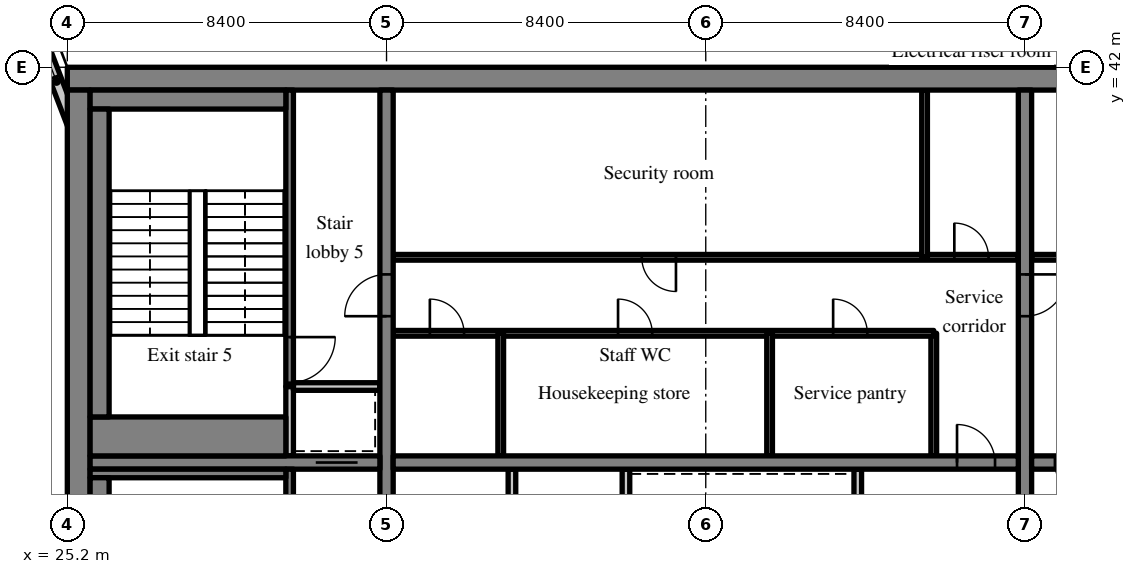
"""IFC4 building model, lengths in metres.
Left out: names, types, materials, properties, quantities, classifications, styles, units other than length and angle.
Written with IfcOpenShell. Run it as: python <this file> out.ifc"""

import sys

from ifc_helpers import new_model, si_unit, direction, frame, frame_2d, origin, place, context, subcontext, project, spatial, rectangle, extrude, source, transform, mapped, element, fill, save


model = new_model("IFC4")
c1 = context("Model", 3, precision=1e-05, world=origin(), true_north=direction((0.0, 1.0)))
c2 = subcontext(c1, "Body", "Model", "MODEL_VIEW")
j1 = project(units=[si_unit("LENGTHUNIT", "METRE"), si_unit("PLANEANGLEUNIT", "RADIAN")], contexts=[c1])
p1 = place(None, origin())
s1 = spatial("IfcSite", under=j1, at=p1, CompositionType="ELEMENT")
p2 = place(p1, origin())
s2 = spatial("IfcBuilding", under=s1, at=p2, CompositionType="ELEMENT")
p3 = place(p2, frame((0.0, 0.0, 245.2)))
s3 = spatial("IfcBuildingStorey", under=s2, at=p3, CompositionType="ELEMENT", Elevation=245.2)
m1 = source(origin(), c2, "Body", "SweptSolid", [
    extrude(rectangle(XDim=50.4, YDim=0.6, at=frame_2d((25.2, 0.0))), origin(), (0.0, 0.0, 1.0), 3.62),
])
p4 = place(p3, frame((25.2, 41.7, 0.0), z_axis=(0.0, 0.0, 1.0), x_axis=(1.0, 0.0, 0.0)))
e1 = element("IfcWall", 1, at=p4, inside=s3, PredefinedType="SHEAR", context=c2, shape_type="MappedRepresentation", body=[
    mapped(m1, transform((0.0, 0.0, 0.0), scale=1.0)),
])
m2 = source(origin(), c2, "Body", "SweptSolid", [
    extrude(rectangle(XDim=18.8, YDim=0.6, at=frame_2d((9.4, 0.0))), origin(), (0.0, 0.0, 1.0), 3.62),
])
p5 = place(p3, frame((25.5, 22.6, 0.0), z_axis=(0.0, 0.0, 1.0), x_axis=(0.0, 1.0, 0.0)))
e2 = element("IfcWall", 2, at=p5, inside=s3, PredefinedType="SHEAR", context=c2, shape_type="MappedRepresentation", body=[
    mapped(m2, transform((0.0, 0.0, 0.0), scale=1.0)),
])
m3 = source(origin(), c2, "Body", "SweptSolid", [
    extrude(rectangle(XDim=18.8, YDim=0.35, at=frame_2d((9.4, 0.0))), origin(), (0.0, 0.0, 1.0), 3.62),
])
p6 = place(p3, frame((33.6, 22.6, 0.0), z_axis=(0.0, 0.0, 1.0), x_axis=(0.0, 1.0, 0.0)))
e3 = element("IfcWall", 3, at=p6, inside=s3, PredefinedType="SHEAR", context=c2, shape_type="MappedRepresentation", body=[
    mapped(m3, transform((0.0, 0.0, 0.0), scale=1.0)),
])
m4 = source(origin(), c2, "Body", "SweptSolid", [
    extrude(rectangle(XDim=1.1, YDim=2.1, at=frame_2d((0.55, 1.05))), frame((0.0, 0.185, 0.0), z_axis=(0.0, -1.0, 0.0), x_axis=(1.0, 0.0, 0.0)), (0.0, 0.0, 1.0), 0.37),
])
p7 = place(p6, frame((12.85, 0.0, 0.0)))
e4 = element("IfcOpeningElement", 4, at=p7, cuts=e3, PredefinedType="OPENING", context=c2, shape_type="MappedRepresentation", body=[
    mapped(m4, transform((0.0, 0.0, 0.0), scale=1.0)),
])
p8 = place(p3, frame((50.4, 22.6, 0.0), z_axis=(0.0, 0.0, 1.0), x_axis=(0.0, 1.0, 0.0)))
e5 = element("IfcWall", 5, at=p8, inside=s3, PredefinedType="SHEAR", context=c2, shape_type="MappedRepresentation", body=[
    mapped(m3, transform((0.0, 0.0, 0.0), scale=1.0)),
])
p9 = place(p8, frame((12.85, 0.0, 0.0)))
e6 = element("IfcOpeningElement", 6, at=p9, cuts=e5, PredefinedType="OPENING", context=c2, shape_type="MappedRepresentation", body=[
    mapped(m4, transform((0.0, 0.0, 0.0), scale=1.0)),
])
m5 = source(origin(), c2, "Body", "SweptSolid", [
    extrude(rectangle(XDim=7.625, YDim=0.35, at=frame_2d((3.812, 0.0))), origin(), (0.0, 0.0, 1.0), 3.62),
])
p10 = place(p3, frame((25.8, 31.6, 0.0), z_axis=(0.0, 0.0, 1.0), x_axis=(1.0, 0.0, 0.0)))
e7 = element("IfcWall", 7, at=p10, inside=s3, PredefinedType="SHEAR", context=c2, shape_type="MappedRepresentation", body=[
    mapped(m5, transform((0.0, 0.0, 0.0), scale=1.0)),
])
p11 = place(p10, frame((5.938, 0.0, 0.0)))
e8 = element("IfcOpeningElement", 8, at=p11, cuts=e7, PredefinedType="OPENING", context=c2, shape_type="MappedRepresentation", body=[
    mapped(m4, transform((0.0, 0.0, 0.0), scale=1.0)),
])
m6 = source(origin(), c2, "Body", "SweptSolid", [
    extrude(rectangle(XDim=16.45, YDim=0.35, at=frame_2d((8.225, 0.0))), origin(), (0.0, 0.0, 1.0), 3.62),
])
p12 = place(p3, frame((33.775, 31.6, 0.0), z_axis=(0.0, 0.0, 1.0), x_axis=(1.0, 0.0, 0.0)))
e9 = element("IfcWall", 9, at=p12, inside=s3, PredefinedType="SHEAR", context=c2, shape_type="MappedRepresentation", body=[
    mapped(m6, transform((0.0, 0.0, 0.0), scale=1.0)),
])
m7 = source(origin(), c2, "Body", "SweptSolid", [
    extrude(rectangle(XDim=1.0, YDim=2.1, at=frame_2d((0.5, 1.05))), frame((0.0, 0.185, 0.0), z_axis=(0.0, -1.0, 0.0), x_axis=(1.0, 0.0, 0.0)), (0.0, 0.0, 1.0), 0.37),
])
p13 = place(p12, frame((14.837, 0.0, 0.0)))
e10 = element("IfcOpeningElement", 10, at=p13, cuts=e9, PredefinedType="OPENING", context=c2, shape_type="MappedRepresentation", body=[
    mapped(m7, transform((0.0, 0.0, 0.0), scale=1.0)),
])
m8 = source(origin(), c2, "Body", "SweptSolid", [
    extrude(rectangle(XDim=16.45, YDim=0.35, at=frame_2d((8.225, 0.0))), origin(), (0.0, 0.0, 1.0), 3.62),
])
p14 = place(p3, frame((50.575, 31.6, 0.0), z_axis=(0.0, 0.0, 1.0), x_axis=(1.0, 0.0, 0.0)))
e11 = element("IfcWall", 11, at=p14, inside=s3, PredefinedType="SHEAR", context=c2, shape_type="MappedRepresentation", body=[
    mapped(m8, transform((0.0, 0.0, 0.0), scale=1.0)),
])
p15 = place(p14, frame((0.613, 0.0, 0.0)))
e12 = element("IfcOpeningElement", 12, at=p15, cuts=e11, PredefinedType="OPENING", context=c2, shape_type="MappedRepresentation", body=[
    mapped(m7, transform((0.0, 0.0, 0.0), scale=1.0)),
])
m9 = source(origin(), c2, "Body", "SweptSolid", [
    extrude(rectangle(XDim=3.559, YDim=0.3, at=frame_2d((1.78, 0.0))), origin(), (0.0, 0.0, 1.0), 3.62),
])
p16 = place(p3, frame((25.55, 39.969, 0.0), z_axis=(0.0, 0.0, 1.0), x_axis=(-0.35779745313, 0.933799219604, 0.0)))
e13 = element("IfcWall", 13, at=p16, inside=s3, PredefinedType="SOLIDWALL", context=c2, shape_type="MappedRepresentation", body=[
    mapped(m9, transform((0.0, 0.0, 0.0), scale=1.0)),
])
m10 = source(origin(), c2, "Body", "SweptSolid", [
    extrude(rectangle(XDim=1.5, YDim=2.0, at=frame_2d((0.75, 1.0))), frame((0.0, 0.16, 0.0), z_axis=(0.0, -1.0, 0.0), x_axis=(1.0, 0.0, 0.0)), (0.0, 0.0, 1.0), 0.32),
])
p17 = place(p16, frame((1.903, 0.0, 0.9)))
e14 = element("IfcOpeningElement", 14, at=p17, cuts=e13, PredefinedType="OPENING", context=c2, shape_type="MappedRepresentation", body=[
    mapped(m10, transform((0.0, 0.0, 0.0), scale=1.0)),
])
m11 = source(origin(), c2, "Body", "SweptSolid", [
    extrude(rectangle(XDim=8.825, YDim=0.2, at=frame_2d((4.413, 0.0))), origin(), (0.0, 0.0, 1.0), 3.62),
])
p18 = place(p3, frame((39.9, 22.6, 0.0), z_axis=(0.0, 0.0, 1.0), x_axis=(0.0, 1.0, 0.0)))
e15 = element("IfcWall", 15, at=p18, inside=s3, PredefinedType="PARTITIONING", context=c2, shape_type="MappedRepresentation", body=[
    mapped(m11, transform((0.0, 0.0, 0.0), scale=1.0)),
])
m12 = source(origin(), c2, "Body", "SweptSolid", [
    extrude(rectangle(XDim=0.9, YDim=2.1, at=frame_2d((0.45, 1.05))), frame((0.0, 0.11, 0.0), z_axis=(0.0, -1.0, 0.0), x_axis=(1.0, 0.0, 0.0)), (0.0, 0.0, 1.0), 0.22),
])
p19 = place(p18, frame((3.15, 0.0, 0.0)))
e16 = element("IfcOpeningElement", 16, at=p19, cuts=e15, PredefinedType="OPENING", context=c2, shape_type="MappedRepresentation", body=[
    mapped(m12, transform((0.0, 0.0, 0.0), scale=1.0)),
])
p20 = place(p18, frame((4.95, 0.0, 0.0)))
e17 = element("IfcOpeningElement", 17, at=p20, cuts=e15, PredefinedType="OPENING", context=c2, shape_type="MappedRepresentation", body=[
    mapped(m12, transform((0.0, 0.0, 0.0), scale=1.0)),
])
m13 = source(origin(), c2, "Body", "SweptSolid", [
    extrude(rectangle(XDim=2.625, YDim=0.2, at=frame_2d((1.312, 0.0))), origin(), (0.0, 0.0, 1.0), 3.62),
])
p21 = place(p3, frame((46.0, 28.8, 0.0), z_axis=(0.0, 0.0, 1.0), x_axis=(0.0, 1.0, 0.0)))
e18 = element("IfcWall", 18, at=p21, inside=s3, PredefinedType="SOLIDWALL", context=c2, shape_type="MappedRepresentation", body=[
    mapped(m13, transform((0.0, 0.0, 0.0), scale=1.0)),
])
p22 = place(p3, frame((36.9, 22.6, 0.0), z_axis=(0.0, 0.0, 1.0), x_axis=(0.0, 1.0, 0.0)))
e19 = element("IfcWall", 19, at=p22, inside=s3, PredefinedType="PARTITIONING", context=c2, shape_type="MappedRepresentation", body=[
    mapped(m11, transform((0.0, 0.0, 0.0), scale=1.0)),
])
m14 = source(origin(), c2, "Body", "SweptSolid", [
    extrude(rectangle(XDim=3.225, YDim=0.15, at=frame_2d((1.613, 0.0))), origin(), (0.0, 0.0, 1.0), 3.62),
])
p23 = place(p3, frame((48.0, 31.775, 0.0), z_axis=(0.0, 0.0, 1.0), x_axis=(0.0, 1.0, 0.0)))
e20 = element("IfcWall", 20, at=p23, inside=s3, PredefinedType="PARTITIONING", context=c2, shape_type="MappedRepresentation", body=[
    mapped(m14, transform((0.0, 0.0, 0.0), scale=1.0)),
])
m15 = source(origin(), c2, "Body", "SweptSolid", [
    extrude(rectangle(XDim=14.225, YDim=0.15, at=frame_2d((7.113, 0.0))), origin(), (0.0, 0.0, 1.0), 3.62),
])
p24 = place(p3, frame((33.775, 35.0, 0.0), z_axis=(0.0, 0.0, 1.0), x_axis=(1.0, 0.0, 0.0)))
e21 = element("IfcWall", 21, at=p24, inside=s3, PredefinedType="PARTITIONING", context=c2, shape_type="MappedRepresentation", body=[
    mapped(m15, transform((0.0, 0.0, 0.0), scale=1.0)),
])
m16 = source(origin(), c2, "Body", "SweptSolid", [
    extrude(rectangle(XDim=0.9, YDim=2.1, at=frame_2d((0.45, 1.05))), frame((0.0, 0.085, 0.0), z_axis=(0.0, -1.0, 0.0), x_axis=(1.0, 0.0, 0.0)), (0.0, 0.0, 1.0), 0.17),
])
p25 = place(p24, frame((0.965, 0.0, 0.0)))
e22 = element("IfcOpeningElement", 22, at=p25, cuts=e21, PredefinedType="OPENING", context=c2, shape_type="MappedRepresentation", body=[
    mapped(m16, transform((0.0, 0.0, 0.0), scale=1.0)),
])
p26 = place(p24, frame((5.917, 0.0, 0.0)))
e23 = element("IfcOpeningElement", 23, at=p26, cuts=e21, PredefinedType="OPENING", context=c2, shape_type="MappedRepresentation", body=[
    mapped(m16, transform((0.0, 0.0, 0.0), scale=1.0)),
])
p27 = place(p24, frame((11.577, 0.0, 0.0)))
e24 = element("IfcOpeningElement", 24, at=p27, cuts=e21, PredefinedType="OPENING", context=c2, shape_type="MappedRepresentation", body=[
    mapped(m16, transform((0.0, 0.0, 0.0), scale=1.0)),
])
m17 = source(origin(), c2, "Body", "SweptSolid", [
    extrude(rectangle(XDim=16.45, YDim=0.15, at=frame_2d((8.225, 0.0))), origin(), (0.0, 0.0, 1.0), 3.62),
])
p28 = place(p3, frame((33.775, 37.0, 0.0), z_axis=(0.0, 0.0, 1.0), x_axis=(1.0, 0.0, 0.0)))
e25 = element("IfcWall", 25, at=p28, inside=s3, PredefinedType="PARTITIONING", context=c2, shape_type="MappedRepresentation", body=[
    mapped(m17, transform((0.0, 0.0, 0.0), scale=1.0)),
])
p29 = place(p28, frame((6.541, 0.0, 0.0)))
e26 = element("IfcOpeningElement", 26, at=p29, cuts=e25, PredefinedType="OPENING", context=c2, shape_type="MappedRepresentation", body=[
    mapped(m16, transform((0.0, 0.0, 0.0), scale=1.0)),
])
p30 = place(p28, frame((14.766, 0.0, 0.0)))
e27 = element("IfcOpeningElement", 27, at=p30, cuts=e25, PredefinedType="OPENING", context=c2, shape_type="MappedRepresentation", body=[
    mapped(m16, transform((0.0, 0.0, 0.0), scale=1.0)),
])
for number, where, z_axis, x_axis in (
    (28, (36.605, 31.775, 0.0), (0.0, 0.0, 1.0), (0.0, 1.0, 0.0)),
    (29, (43.68, 31.775, 0.0), (0.0, 0.0, 1.0), (0.0, 1.0, 0.0)),
):
    element("IfcWall", number, at=place(p3, frame(where, z_axis=z_axis, x_axis=x_axis)), inside=s3, PredefinedType="PARTITIONING", context=c2, shape_type="MappedRepresentation", body=[
        mapped(m14, transform((0.0, 0.0, 0.0), scale=1.0)),
    ])
m18 = source(origin(), c2, "Body", "SweptSolid", [
    extrude(rectangle(XDim=4.4, YDim=0.15, at=frame_2d((2.2, 0.0))), origin(), (0.0, 0.0, 1.0), 3.62),
])
p31 = place(p3, frame((47.758, 37.0, 0.0), z_axis=(0.0, 0.0, 1.0), x_axis=(0.0, 1.0, 0.0)))
e30 = element("IfcWall", 30, at=p31, inside=s3, PredefinedType="PARTITIONING", context=c2, shape_type="MappedRepresentation", body=[
    mapped(m18, transform((0.0, 0.0, 0.0), scale=1.0)),
])
m19 = source(origin(), c2, "Body", "SweptSolid", [
    extrude(rectangle(XDim=16.45, YDim=0.15, at=frame_2d((8.225, 0.0))), origin(), (0.0, 0.0, 1.0), 3.62),
])
p32 = place(p3, frame((67.025, 37.0, 0.0), z_axis=(0.0, 0.0, 1.0), x_axis=(-1.0, 0.0, 0.0)))
e31 = element("IfcWall", 31, at=p32, inside=s3, PredefinedType="PARTITIONING", context=c2, shape_type="MappedRepresentation", body=[
    mapped(m19, transform((0.0, 0.0, 0.0), scale=1.0)),
])
p33 = place(p32, frame((1.606, 0.0, 0.0)))
e32 = element("IfcOpeningElement", 32, at=p33, cuts=e31, PredefinedType="OPENING", context=c2, shape_type="MappedRepresentation", body=[
    mapped(m16, transform((0.0, 0.0, 0.0), scale=1.0)),
])
p34 = place(p32, frame((7.364, 0.0, 0.0)))
e33 = element("IfcOpeningElement", 33, at=p34, cuts=e31, PredefinedType="OPENING", context=c2, shape_type="MappedRepresentation", body=[
    mapped(m16, transform((0.0, 0.0, 0.0), scale=1.0)),
])
p35 = place(p32, frame((12.299, 0.0, 0.0)))
e34 = element("IfcOpeningElement", 34, at=p35, cuts=e31, PredefinedType="OPENING", context=c2, shape_type="MappedRepresentation", body=[
    mapped(m16, transform((0.0, 0.0, 0.0), scale=1.0)),
])
p36 = place(p32, frame((14.766, 0.0, 0.0)))
e35 = element("IfcOpeningElement", 35, at=p36, cuts=e31, PredefinedType="OPENING", context=c2, shape_type="MappedRepresentation", body=[
    mapped(m16, transform((0.0, 0.0, 0.0), scale=1.0)),
])
m20 = source(origin(), c2, "Body", "SweptSolid", [
    extrude(rectangle(XDim=8.825, YDim=0.2, at=frame_2d((4.413, 0.0))), origin(), (0.0, 0.0, 1.0), 3.62),
])
p37 = place(p3, frame((31.05, 22.6, 0.0), z_axis=(0.0, 0.0, 1.0), x_axis=(0.0, 1.0, 0.0)))
e36 = element("IfcWall", 36, at=p37, inside=s3, PredefinedType="SOLIDWALL", context=c2, shape_type="MappedRepresentation", body=[
    mapped(m20, transform((0.0, 0.0, 0.0), scale=1.0)),
])
m21 = source(origin(), c2, "Body", "SweptSolid", [
    extrude(rectangle(XDim=1.2, YDim=2.1, at=frame_2d((0.6, 1.05))), frame((0.0, 0.11, 0.0), z_axis=(0.0, -1.0, 0.0), x_axis=(1.0, 0.0, 0.0)), (0.0, 0.0, 1.0), 0.22),
])
p38 = place(p37, frame((1.0, 0.0, 0.0)))
e37 = element("IfcOpeningElement", 37, at=p38, cuts=e36, PredefinedType="OPENING", context=c2, shape_type="MappedRepresentation", body=[
    mapped(m21, transform((0.0, 0.0, 0.0), scale=1.0)),
])
m22 = source(origin(), c2, "Body", "SweptSolid", [
    extrude(rectangle(XDim=1.825, YDim=0.2, at=frame_2d((0.913, 0.0))), origin(), (0.0, 0.0, 1.0), 3.62),
])
p39 = place(p3, frame((31.05, 31.775, 0.0), z_axis=(0.0, 0.0, 1.0), x_axis=(0.0, 1.0, 0.0)))
e38 = element("IfcWall", 38, at=p39, inside=s3, PredefinedType="SOLIDWALL", context=c2, shape_type="MappedRepresentation", body=[
    mapped(m22, transform((0.0, 0.0, 0.0), scale=1.0)),
])
m23 = source(origin(), c2, "Body", "SweptSolid", [
    extrude(rectangle(XDim=2.275, YDim=0.2, at=frame_2d((1.138, 0.0))), origin(), (0.0, 0.0, 1.0), 3.62),
])
p40 = place(p3, frame((31.15, 33.6, 0.0), z_axis=(0.0, 0.0, 1.0), x_axis=(1.0, 0.0, 0.0)))
e39 = element("IfcWall", 39, at=p40, inside=s3, PredefinedType="SOLIDWALL", context=c2, shape_type="MappedRepresentation", body=[
    mapped(m23, transform((0.0, 0.0, 0.0), scale=1.0)),
])
m24 = source(origin(), c2, "Body", "SweptSolid", [
    extrude(rectangle(XDim=7.8, YDim=0.2, at=frame_2d((3.9, 0.0))), origin(), (0.0, 0.0, 1.0), 3.62),
])
p41 = place(p3, frame((31.05, 33.6, 0.0), z_axis=(0.0, 0.0, 1.0), x_axis=(0.0, 1.0, 0.0)))
e40 = element("IfcWall", 40, at=p41, inside=s3, PredefinedType="SOLIDWALL", context=c2, shape_type="MappedRepresentation", body=[
    mapped(m24, transform((0.0, 0.0, 0.0), scale=1.0)),
])
p42 = place(p41, frame((0.1, 0.0, 0.0)))
e41 = element("IfcOpeningElement", 41, at=p42, cuts=e40, PredefinedType="OPENING", context=c2, shape_type="MappedRepresentation", body=[
    mapped(m21, transform((0.0, 0.0, 0.0), scale=1.0)),
])
m25 = source(origin(), c2, "Body", "SweptSolid", [
    extrude(rectangle(XDim=5.15, YDim=0.225, at=frame_2d((2.575, 0.0))), origin(), (0.0, 0.0, 1.0), 3.62),
])
p43 = place(p3, frame((25.8, 31.312, 0.0), z_axis=(0.0, 0.0, 1.0), x_axis=(1.0, 0.0, 0.0)))
e42 = element("IfcWall", 42, at=p43, inside=s3, PredefinedType="SOLIDWALL", context=c2, shape_type="MappedRepresentation", body=[
    mapped(m25, transform((0.0, 0.0, 0.0), scale=1.0)),
])
m26 = source(origin(), c2, "Body", "SweptSolid", [
    extrude(rectangle(XDim=8.1, YDim=0.5, at=frame_2d((4.05, 0.0))), origin(), (0.0, 0.0, 1.0), 3.62),
])
p44 = place(p3, frame((26.05, 23.1, 0.0), z_axis=(0.0, 0.0, 1.0), x_axis=(0.0, 1.0, 0.0)))
e43 = element("IfcWall", 43, at=p44, inside=s3, PredefinedType="SOLIDWALL", context=c2, shape_type="MappedRepresentation", body=[
    mapped(m26, transform((0.0, 0.0, 0.0), scale=1.0)),
])
m27 = source(origin(), c2, "Body", "SweptSolid", [
    extrude(rectangle(XDim=5.15, YDim=0.5, at=frame_2d((2.575, 0.0))), origin(), (0.0, 0.0, 1.0), 3.62),
])
p45 = place(p3, frame((25.8, 41.15, 0.0), z_axis=(0.0, 0.0, 1.0), x_axis=(1.0, 0.0, 0.0)))
e44 = element("IfcWall", 44, at=p45, inside=s3, PredefinedType="SOLIDWALL", context=c2, shape_type="MappedRepresentation", body=[
    mapped(m27, transform((0.0, 0.0, 0.0), scale=1.0)),
])
m28 = source(origin(), c2, "Body", "SweptSolid", [
    extrude(rectangle(XDim=5.15, YDim=1.025, at=frame_2d((2.575, 0.0))), origin(), (0.0, 0.0, 1.0), 3.62),
])
p46 = place(p3, frame((25.8, 32.287, 0.0), z_axis=(0.0, 0.0, 1.0), x_axis=(1.0, 0.0, 0.0)))
e45 = element("IfcWall", 45, at=p46, inside=s3, PredefinedType="SOLIDWALL", context=c2, shape_type="MappedRepresentation", body=[
    mapped(m28, transform((0.0, 0.0, 0.0), scale=1.0)),
])
p47 = place(p3, frame((26.05, 32.8, 0.0), z_axis=(0.0, 0.0, 1.0), x_axis=(0.0, 1.0, 0.0)))
e46 = element("IfcWall", 46, at=p47, inside=s3, PredefinedType="SOLIDWALL", context=c2, shape_type="MappedRepresentation", body=[
    mapped(m26, transform((0.0, 0.0, 0.0), scale=1.0)),
])
m29 = source(origin(), c2, "Body", "SweptSolid", [
    extrude(rectangle(XDim=1.5, YDim=2.0, at=frame_2d((0.75, 1.0))), frame((0.0, 0.03, 0.0), z_axis=(0.0, -1.0, 0.0), x_axis=(1.0, 0.0, 0.0)), (0.0, 0.0, 1.0), 0.06),
])
p48 = place(p17, origin())
e47 = element("IfcWindow", 47, at=p48, inside=s3, PartitioningType="SINGLE_PANEL", PredefinedType="WINDOW", context=c2, shape_type="MappedRepresentation", body=[
    mapped(m29, transform((0.0, 0.0, 0.0), scale=1.0)),
])
fill(e14, e47)
m30 = source(origin(), c2, "Body", "SweptSolid", [
    extrude(rectangle(XDim=1.0, YDim=2.1, at=frame_2d((0.5, 1.05))), frame((0.0, 0.025, 0.0), z_axis=(0.0, -1.0, 0.0), x_axis=(1.0, 0.0, 0.0)), (0.0, 0.0, 1.0), 0.05),
])
p49 = place(p13, origin())
e48 = element("IfcDoor", 48, at=p49, inside=s3, OperationType="SINGLE_SWING_LEFT", PredefinedType="DOOR", context=c2, shape_type="MappedRepresentation", body=[
    mapped(m30, transform((0.0, 0.0, 0.0), scale=1.0)),
])
fill(e10, e48)
m31 = source(origin(), c2, "Body", "SweptSolid", [
    extrude(rectangle(XDim=0.9, YDim=2.1, at=frame_2d((0.45, 1.05))), frame((0.0, 0.025, 0.0), z_axis=(0.0, -1.0, 0.0), x_axis=(1.0, 0.0, 0.0)), (0.0, 0.0, 1.0), 0.05),
])
p50 = place(p25, origin())
e49 = element("IfcDoor", 49, at=p50, inside=s3, OperationType="SINGLE_SWING_LEFT", PredefinedType="DOOR", context=c2, shape_type="MappedRepresentation", body=[
    mapped(m31, transform((0.0, 0.0, 0.0), scale=1.0)),
])
fill(e22, e49)
p51 = place(p26, origin())
e50 = element("IfcDoor", 50, at=p51, inside=s3, OperationType="SINGLE_SWING_LEFT", PredefinedType="DOOR", context=c2, shape_type="MappedRepresentation", body=[
    mapped(m31, transform((0.0, 0.0, 0.0), scale=1.0)),
])
fill(e23, e50)
p52 = place(p27, origin())
e51 = element("IfcDoor", 51, at=p52, inside=s3, OperationType="SINGLE_SWING_LEFT", PredefinedType="DOOR", context=c2, shape_type="MappedRepresentation", body=[
    mapped(m31, transform((0.0, 0.0, 0.0), scale=1.0)),
])
fill(e24, e51)
p53 = place(p29, origin())
e52 = element("IfcDoor", 52, at=p53, inside=s3, OperationType="SINGLE_SWING_RIGHT", PredefinedType="DOOR", context=c2, shape_type="MappedRepresentation", body=[
    mapped(m31, transform((0.0, 0.0, 0.0), scale=1.0)),
])
fill(e26, e52)
p54 = place(p30, origin())
e53 = element("IfcDoor", 53, at=p54, inside=s3, OperationType="SINGLE_SWING_LEFT", PredefinedType="DOOR", context=c2, shape_type="MappedRepresentation", body=[
    mapped(m31, transform((0.0, 0.0, 0.0), scale=1.0)),
])
fill(e27, e53)
p55 = place(p15, origin())
e54 = element("IfcDoor", 54, at=p55, inside=s3, OperationType="SINGLE_SWING_RIGHT", PredefinedType="DOOR", context=c2, shape_type="MappedRepresentation", body=[
    mapped(m30, transform((0.0, 0.0, 0.0), scale=1.0)),
])
fill(e12, e54)
m32 = source(origin(), c2, "Body", "SweptSolid", [
    extrude(rectangle(XDim=1.1, YDim=2.1, at=frame_2d((0.55, 1.05))), frame((0.0, 0.025, 0.0), z_axis=(0.0, -1.0, 0.0), x_axis=(1.0, 0.0, 0.0)), (0.0, 0.0, 1.0), 0.05),
])
p56 = place(p11, origin())
e55 = element("IfcDoor", 55, at=p56, inside=s3, OperationType="SLIDING_TO_RIGHT", PredefinedType="DOOR", context=c2, shape_type="MappedRepresentation", body=[
    mapped(m32, transform((0.0, 0.0, 0.0), scale=1.0)),
])
fill(e8, e55)
m33 = source(origin(), c2, "Body", "SweptSolid", [
    extrude(rectangle(XDim=1.2, YDim=2.1, at=frame_2d((0.6, 1.05))), frame((0.0, 0.025, 0.0), z_axis=(0.0, -1.0, 0.0), x_axis=(1.0, 0.0, 0.0)), (0.0, 0.0, 1.0), 0.05),
])
p57 = place(p42, origin())
e56 = element("IfcDoor", 56, at=p57, inside=s3, OperationType="SINGLE_SWING_RIGHT", PredefinedType="DOOR", context=c2, shape_type="MappedRepresentation", body=[
    mapped(m33, transform((0.0, 0.0, 0.0), scale=1.0)),
])
fill(e41, e56)
p58 = place(p7, origin())
e57 = element("IfcDoor", 57, at=p58, inside=s3, OperationType="SINGLE_SWING_LEFT", PredefinedType="DOOR", context=c2, shape_type="MappedRepresentation", body=[
    mapped(m32, transform((0.0, 0.0, 0.0), scale=1.0)),
])
fill(e4, e57)
p59 = place(p9, origin())
e58 = element("IfcDoor", 58, at=p59, inside=s3, OperationType="SINGLE_SWING_RIGHT", PredefinedType="DOOR", context=c2, shape_type="MappedRepresentation", body=[
    mapped(m32, transform((0.0, 0.0, 0.0), scale=1.0)),
])
fill(e6, e58)
save(model, sys.argv[1])
